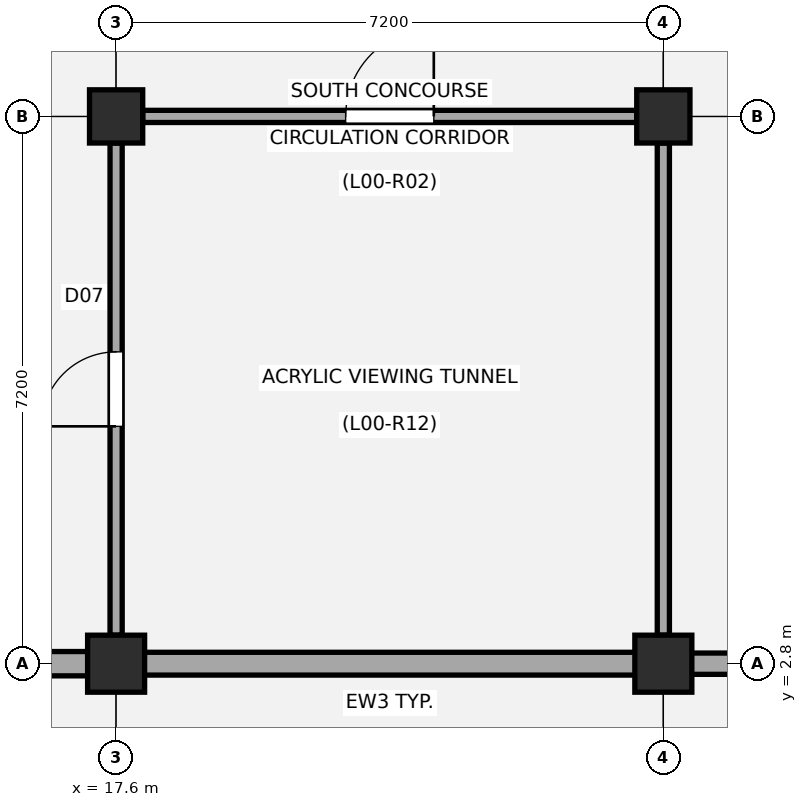
"""IFC4 building model, lengths in metres.
Left out: names, types, materials, properties, quantities, classifications, styles, units other than length and angle.
Written with IfcOpenShell. Run it as: python <this file> out.ifc"""

import sys

from ifc_helpers import new_model, si_unit, direction, frame, frame_2d, origin, origin_2d, place, context, subcontext, project, spatial, rectangle, circle, extrude, element, fill, save


model = new_model("IFC4")
c1 = context("Model", 3, precision=1e-05, world=origin(), true_north=direction((0.0, 1.0)))
c2 = subcontext(c1, "Body", "Model", "MODEL_VIEW")
j1 = project(units=[si_unit("LENGTHUNIT", "METRE"), si_unit("PLANEANGLEUNIT", "RADIAN")], contexts=[c1])
p1 = place(None, origin())
s1 = spatial("IfcSite", under=j1, at=p1, CompositionType="ELEMENT")
p2 = place(p1, origin())
s2 = spatial("IfcBuilding", under=s1, at=p2, CompositionType="ELEMENT")
p3 = place(p2, origin())
s3 = spatial("IfcBuildingStorey", under=s2, at=p3, CompositionType="ELEMENT", Elevation=0.0)
p4 = place(p3, frame((17.6, 2.8, -0.35), z_axis=(0.0, 0.0, 1.0), x_axis=(1.0, 0.0, 0.0)))
e1 = element("IfcColumn", 1, at=p4, inside=s3, PredefinedType="COLUMN", context=c2, shape_type="SweptSolid", body=[
    extrude(circle(Radius=0.375, at=origin_2d()), origin(), (0.0, 0.0, 1.0), 5.03),
])
p5 = place(p3, frame((17.6, 10.0, -0.35), z_axis=(0.0, 0.0, 1.0), x_axis=(1.0, 0.0, 0.0)))
e2 = element("IfcColumn", 2, at=p5, inside=s3, PredefinedType="COLUMN", context=c2, shape_type="SweptSolid", body=[
    extrude(rectangle(XDim=0.7, YDim=0.7, at=origin_2d()), origin(), (0.0, 0.0, 1.0), 5.03),
])
p6 = place(p3, frame((24.8, 2.8, -0.35), z_axis=(0.0, 0.0, 1.0), x_axis=(1.0, 0.0, 0.0)))
e3 = element("IfcColumn", 3, at=p6, inside=s3, PredefinedType="COLUMN", context=c2, shape_type="SweptSolid", body=[
    extrude(circle(Radius=0.375, at=origin_2d()), origin(), (0.0, 0.0, 1.0), 5.03),
])
p7 = place(p3, frame((24.8, 10.0, -0.35), z_axis=(0.0, 0.0, 1.0), x_axis=(1.0, 0.0, 0.0)))
e4 = element("IfcColumn", 4, at=p7, inside=s3, PredefinedType="COLUMN", context=c2, shape_type="SweptSolid", body=[
    extrude(rectangle(XDim=0.7, YDim=0.7, at=origin_2d()), origin(), (0.0, 0.0, 1.0), 5.03),
])
p8 = place(p3, frame((17.29, 2.8, 0.0), z_axis=(0.0, 0.0, 1.0), x_axis=(-1.0, 0.0, 0.0)))
e5 = element("IfcWall", 5, at=p8, inside=s3, PredefinedType="STANDARD", context=c2, shape_type="SweptSolid", body=[
    extrude(rectangle(XDim=6.58, YDim=0.32, at=frame_2d((3.29, 0.0))), origin(), (0.0, 0.0, 1.0), 3.67),
])
p9 = place(p8, frame((2.39, 0.0, 0.0)))
e6 = element("IfcOpeningElement", 6, at=p9, cuts=e5, PredefinedType="OPENING", context=c2, shape_type="SweptSolid", body=[
    extrude(rectangle(XDim=1.8, YDim=2.2, at=frame_2d((0.9, 1.1))), frame((0.0, 0.17, 0.0), z_axis=(0.0, -1.0, 0.0), x_axis=(1.0, 0.0, 0.0)), (0.0, 0.0, 1.0), 0.34),
])
p10 = place(p3, frame((24.49, 2.8, 0.0), z_axis=(0.0, 0.0, 1.0), x_axis=(-1.0, 0.0, 0.0)))
e7 = element("IfcWall", 7, at=p10, inside=s3, PredefinedType="STANDARD", context=c2, shape_type="SweptSolid", body=[
    extrude(rectangle(XDim=6.58, YDim=0.3, at=frame_2d((3.29, 0.0))), origin(), (0.0, 0.0, 1.0), 3.67),
])
p11 = place(p3, frame((31.69, 2.8, 0.0), z_axis=(0.0, 0.0, 1.0), x_axis=(-1.0, 0.0, 0.0)))
e8 = element("IfcWall", 8, at=p11, inside=s3, PredefinedType="STANDARD", context=c2, shape_type="SweptSolid", body=[
    extrude(rectangle(XDim=6.58, YDim=0.28, at=frame_2d((3.29, 0.0))), origin(), (0.0, 0.0, 1.0), 3.67),
])
p12 = place(p11, frame((2.37, 0.0, 0.0)))
e9 = element("IfcOpeningElement", 9, at=p12, cuts=e8, PredefinedType="OPENING", context=c2, shape_type="SweptSolid", body=[
    extrude(rectangle(XDim=1.84, YDim=2.22, at=frame_2d((0.92, 1.11))), frame((0.0, 0.15, 0.0), z_axis=(0.0, -1.0, 0.0), x_axis=(1.0, 0.0, 0.0)), (0.0, 0.0, 1.0), 0.3),
])
p13 = place(p3, frame((17.6, 3.175, 0.0), z_axis=(0.0, 0.0, 1.0), x_axis=(0.0, 1.0, 0.0)))
e10 = element("IfcWall", 10, at=p13, inside=s3, PredefinedType="PARTITIONING", context=c2, shape_type="SweptSolid", body=[
    extrude(rectangle(XDim=6.475, YDim=0.16, at=frame_2d((3.237, 0.0))), origin(), (0.0, 0.0, 1.0), 3.62),
])
p14 = place(p13, frame((2.748, 0.0, 0.0)))
e11 = element("IfcOpeningElement", 11, at=p14, cuts=e10, PredefinedType="OPENING", context=c2, shape_type="SweptSolid", body=[
    extrude(rectangle(XDim=0.98, YDim=2.12, at=frame_2d((0.49, 1.06))), frame((0.0, 0.09, 0.0), z_axis=(0.0, -1.0, 0.0), x_axis=(1.0, 0.0, 0.0)), (0.0, 0.0, 1.0), 0.18),
])
p15 = place(p3, frame((24.8, 3.175, 0.0), z_axis=(0.0, 0.0, 1.0), x_axis=(0.0, 1.0, 0.0)))
e12 = element("IfcWall", 12, at=p15, inside=s3, PredefinedType="PARTITIONING", context=c2, shape_type="SweptSolid", body=[
    extrude(rectangle(XDim=6.475, YDim=0.16, at=frame_2d((3.237, 0.0))), origin(), (0.0, 0.0, 1.0), 3.62),
])
p16 = place(p3, frame((17.95, 10.0, 0.0), z_axis=(0.0, 0.0, 1.0), x_axis=(1.0, 0.0, 0.0)))
e13 = element("IfcWall", 13, at=p16, inside=s3, PredefinedType="PARTITIONING", context=c2, shape_type="SweptSolid", body=[
    extrude(rectangle(XDim=6.5, YDim=0.16, at=frame_2d((3.25, 0.0))), origin(), (0.0, 0.0, 1.0), 3.62),
])
p17 = place(p16, frame((2.67, 0.0, 0.0)))
e14 = element("IfcOpeningElement", 14, at=p17, cuts=e13, PredefinedType="OPENING", context=c2, shape_type="SweptSolid", body=[
    extrude(rectangle(XDim=1.16, YDim=2.18, at=frame_2d((0.58, 1.09))), frame((0.0, 0.09, 0.0), z_axis=(0.0, -1.0, 0.0), x_axis=(1.0, 0.0, 0.0)), (0.0, 0.0, 1.0), 0.18),
])
p18 = place(p14, origin())
e15 = element("IfcDoor", 15, at=p18, inside=s3, OperationType="SINGLE_SWING_LEFT", PredefinedType="DOOR", context=c2, shape_type="SweptSolid", body=[
    extrude(rectangle(XDim=0.98, YDim=2.12, at=frame_2d((0.49, 1.06))), frame((0.0, 0.025, 0.0), z_axis=(0.0, -1.0, 0.0), x_axis=(1.0, 0.0, 0.0)), (0.0, 0.0, 1.0), 0.05),
])
fill(e11, e15)
p19 = place(p17, origin())
e16 = element("IfcDoor", 16, at=p19, inside=s3, OperationType="SINGLE_SWING_RIGHT", PredefinedType="DOOR", context=c2, shape_type="SweptSolid", body=[
    extrude(rectangle(XDim=1.16, YDim=2.18, at=frame_2d((0.58, 1.09))), frame((0.0, 0.025, 0.0), z_axis=(0.0, -1.0, 0.0), x_axis=(1.0, 0.0, 0.0)), (0.0, 0.0, 1.0), 0.05),
])
fill(e14, e16)
save(model, sys.argv[1])
